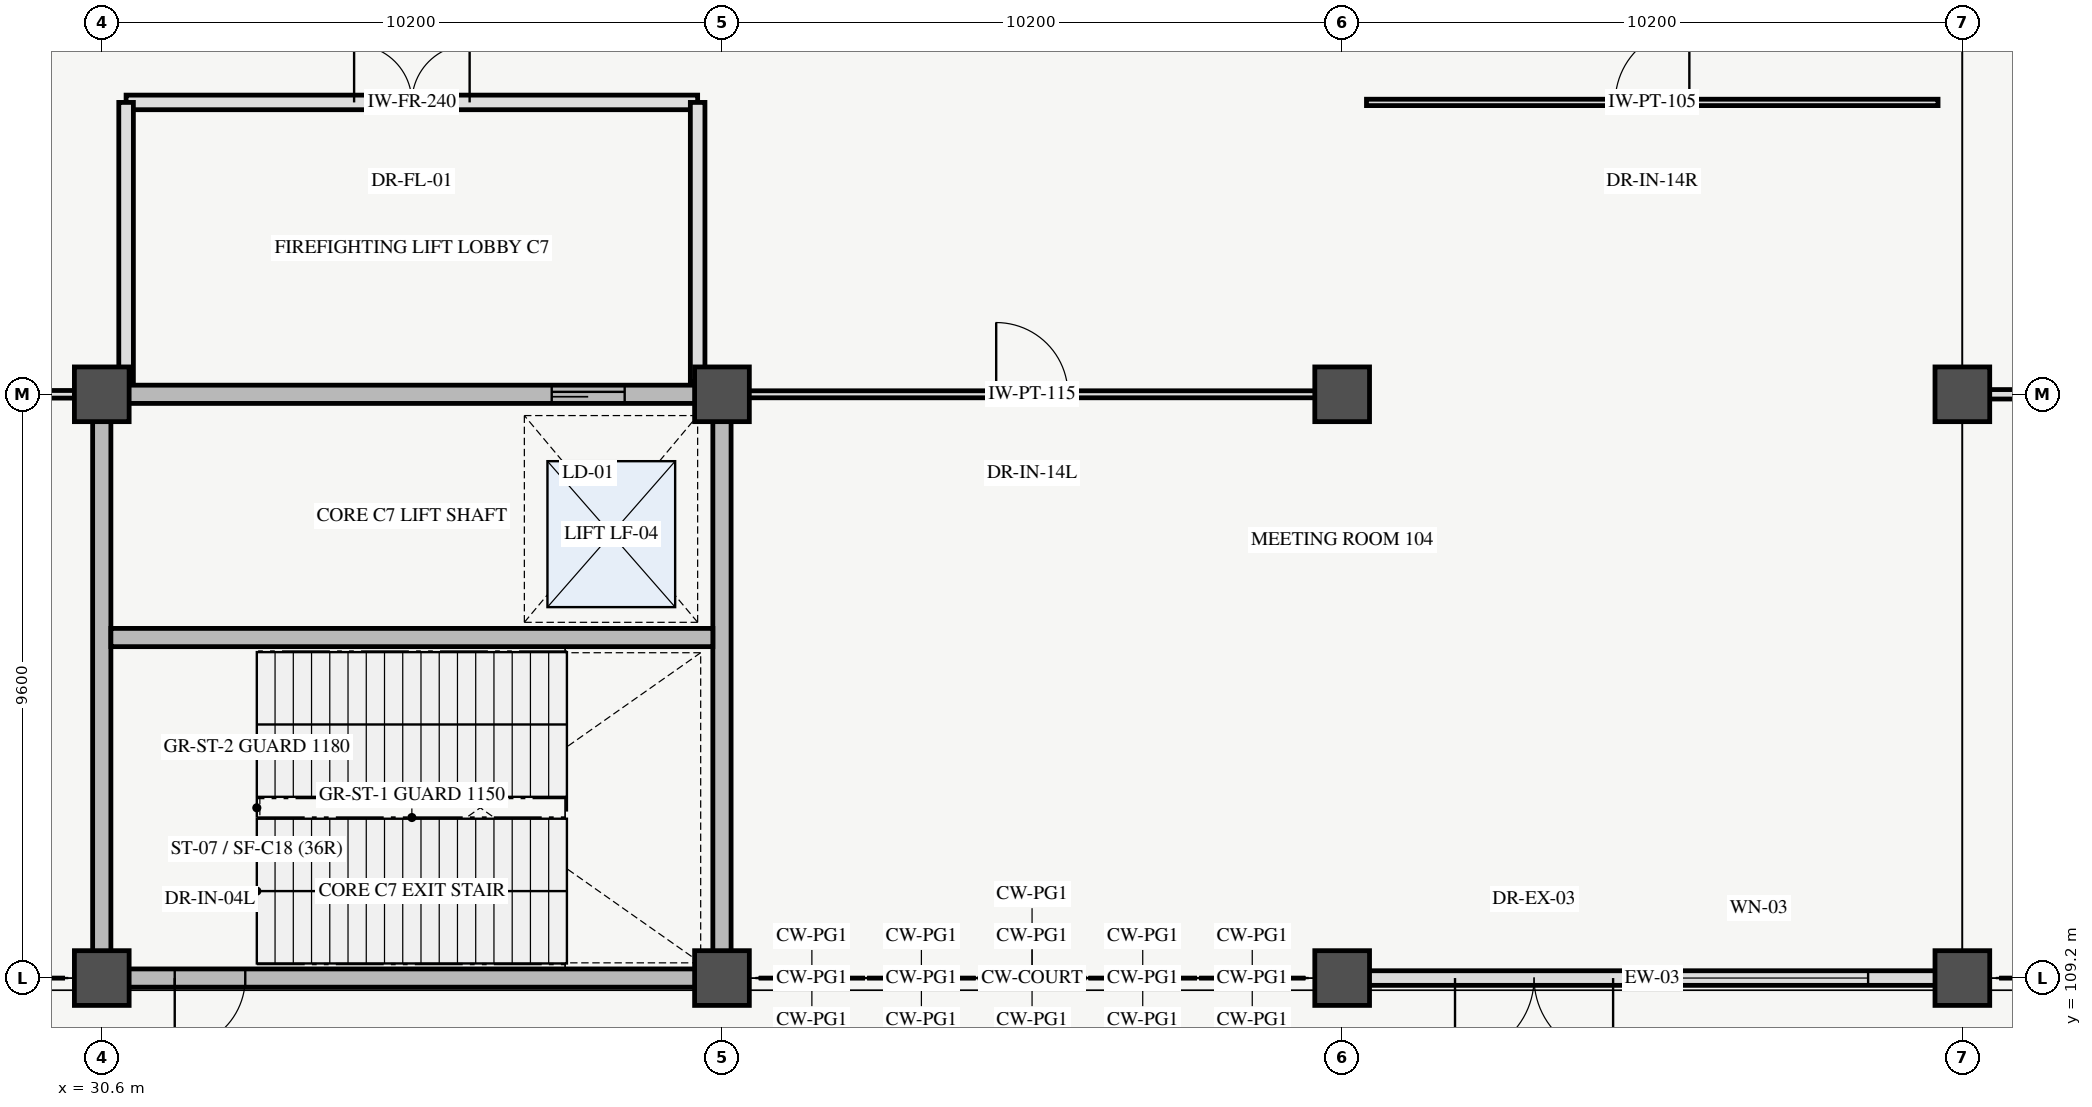
"""IFC4 building model, lengths in metres.
Left out: names, types, materials, properties, quantities, classifications, styles, units other than length and angle.
Written with IfcOpenShell. Run it as: python <this file> out.ifc"""

import sys

from ifc_helpers import new_model, si_unit, direction, frame, frame_2d, origin, origin_2d, place, context, subcontext, project, spatial, rectangle, extrude, element, fill, save


model = new_model("IFC4")
c1 = context("Model", 3, precision=1e-05, world=origin(), true_north=direction((0.0, 1.0)))
c2 = subcontext(c1, "Body", "Model", "MODEL_VIEW")
j1 = project(units=[si_unit("LENGTHUNIT", "METRE"), si_unit("PLANEANGLEUNIT", "RADIAN")], contexts=[c1])
p1 = place(None, origin())
s1 = spatial("IfcSite", under=j1, at=p1, CompositionType="ELEMENT")
p2 = place(p1, origin())
s2 = spatial("IfcBuilding", under=s1, at=p2, CompositionType="ELEMENT")
p3 = place(p2, origin())
s3 = spatial("IfcBuildingStorey", under=s2, at=p3, CompositionType="ELEMENT", Elevation=0.0)
for number, where, z_axis, x_axis in (
    (1, (30.6, 109.2, 0.0), (0.0, 0.0, 1.0), (1.0, 0.0, 0.0)),
    (2, (30.6, 118.8, 0.0), (0.0, 0.0, 1.0), (1.0, 0.0, 0.0)),
    (3, (40.8, 109.2, 0.0), (0.0, 0.0, 1.0), (1.0, 0.0, 0.0)),
    (4, (40.8, 118.8, 0.0), (0.0, 0.0, 1.0), (1.0, 0.0, 0.0)),
    (5, (51.0, 109.2, 0.0), (0.0, 0.0, 1.0), (1.0, 0.0, 0.0)),
    (6, (51.0, 118.8, 0.0), (0.0, 0.0, 1.0), (1.0, 0.0, 0.0)),
    (7, (61.2, 109.2, 0.0), (0.0, 0.0, 1.0), (1.0, 0.0, 0.0)),
    (8, (61.2, 118.8, 0.0), (0.0, 0.0, 1.0), (1.0, 0.0, 0.0)),
):
    element("IfcColumn", number, at=place(p3, frame(where, z_axis=z_axis, x_axis=x_axis)), inside=s3, PredefinedType="COLUMN", context=c2, shape_type="SweptSolid", body=[
        extrude(rectangle(XDim=0.9, YDim=0.9, at=origin_2d()), origin(), (0.0, 0.0, 1.0), 5.4),
    ])
p4 = place(p3, frame((30.6, 109.2, 0.0), z_axis=(0.0, 0.0, 1.0), x_axis=(1.0, 0.0, 0.0)))
e9 = element("IfcWall", 9, at=p4, inside=s3, PredefinedType="SHEAR", context=c2, shape_type="SweptSolid", body=[
    extrude(rectangle(XDim=10.2, YDim=0.3, at=frame_2d((5.1, 0.0))), origin(), (0.0, 0.0, 1.0), 5.4),
])
p5 = place(p4, frame((1.2, 0.0, 0.0)))
e10 = element("IfcOpeningElement", 10, at=p5, cuts=e9, PredefinedType="OPENING", context=c2, shape_type="SweptSolid", body=[
    extrude(rectangle(XDim=1.16, YDim=2.2, at=frame_2d((0.58, 1.1))), frame((0.0, 0.16, 0.0), z_axis=(0.0, -1.0, 0.0), x_axis=(1.0, 0.0, 0.0)), (0.0, 0.0, 1.0), 0.32),
])
p6 = place(p3, frame((30.6, 118.8, 0.0), z_axis=(0.0, 0.0, 1.0), x_axis=(1.0, 0.0, 0.0)))
e11 = element("IfcWall", 11, at=p6, inside=s3, PredefinedType="SHEAR", context=c2, shape_type="SweptSolid", body=[
    extrude(rectangle(XDim=10.2, YDim=0.3, at=frame_2d((5.1, 0.0))), origin(), (0.0, 0.0, 1.0), 5.4),
])
p7 = place(p6, frame((7.4, 0.0, 0.0)))
e12 = element("IfcOpeningElement", 12, at=p7, cuts=e11, PredefinedType="OPENING", context=c2, shape_type="SweptSolid", body=[
    extrude(rectangle(XDim=1.2, YDim=2.25, at=frame_2d((0.6, 1.125))), frame((0.0, 0.16, 0.0), z_axis=(0.0, -1.0, 0.0), x_axis=(1.0, 0.0, 0.0)), (0.0, 0.0, 1.0), 0.32),
])
for number, where, z_axis, x_axis in (
    (13, (30.6, 109.2, 0.0), (0.0, 0.0, 1.0), (0.0, 1.0, 0.0)),
    (14, (40.8, 109.2, 0.0), (0.0, 0.0, 1.0), (0.0, 1.0, 0.0)),
):
    element("IfcWall", number, at=place(p3, frame(where, z_axis=z_axis, x_axis=x_axis)), inside=s3, PredefinedType="SHEAR", context=c2, shape_type="SweptSolid", body=[
        extrude(rectangle(XDim=9.6, YDim=0.3, at=frame_2d((4.8, 0.0))), origin(), (0.0, 0.0, 1.0), 5.4),
    ])
p8 = place(p3, frame((51.24, 109.2, 0.0), z_axis=(0.0, 0.0, 1.0), x_axis=(1.0, 0.0, 0.0)))
e15 = element("IfcWall", 15, at=p8, inside=s3, PredefinedType="STANDARD", context=c2, shape_type="SweptSolid", body=[
    extrude(rectangle(XDim=9.72, YDim=0.24, at=frame_2d((4.86, 0.0))), origin(), (0.0, 0.0, 1.0), 3.68),
])
p9 = place(p8, frame((1.616, 0.0, 0.0)))
e16 = element("IfcOpeningElement", 16, at=p9, cuts=e15, PredefinedType="OPENING", context=c2, shape_type="SweptSolid", body=[
    extrude(rectangle(XDim=2.6, YDim=2.4, at=frame_2d((1.3, 1.2))), frame((0.0, 0.13, 0.0), z_axis=(0.0, -1.0, 0.0), x_axis=(1.0, 0.0, 0.0)), (0.0, 0.0, 1.0), 0.26),
])
p10 = place(p8, frame((4.81, 0.0, 0.9)))
e17 = element("IfcOpeningElement", 17, at=p10, cuts=e15, PredefinedType="OPENING", context=c2, shape_type="SweptSolid", body=[
    extrude(rectangle(XDim=3.6, YDim=2.1, at=frame_2d((1.8, 1.05))), frame((0.0, 0.13, 0.0), z_axis=(0.0, -1.0, 0.0), x_axis=(1.0, 0.0, 0.0)), (0.0, 0.0, 1.0), 0.26),
])
p11 = place(p3, frame((30.75, 114.8, 0.0), z_axis=(0.0, 0.0, 1.0), x_axis=(1.0, 0.0, 0.0)))
e18 = element("IfcWall", 18, at=p11, inside=s3, PredefinedType="SHEAR", context=c2, shape_type="SweptSolid", body=[
    extrude(rectangle(XDim=9.9, YDim=0.3, at=frame_2d((4.95, 0.0))), origin(), (0.0, 0.0, 1.0), 5.4),
])
p12 = place(p3, frame((31.0, 123.6, 0.0), z_axis=(0.0, 0.0, 1.0), x_axis=(1.0, 0.0, 0.0)))
e19 = element("IfcWall", 19, at=p12, inside=s3, PredefinedType="PARTITIONING", context=c2, shape_type="SweptSolid", body=[
    extrude(rectangle(XDim=9.4, YDim=0.24, at=frame_2d((4.7, 0.0))), origin(), (0.0, 0.0, 1.0), 4.08),
])
p13 = place(p12, frame((3.75, 0.0, 0.0)))
e20 = element("IfcOpeningElement", 20, at=p13, cuts=e19, PredefinedType="OPENING", context=c2, shape_type="SweptSolid", body=[
    extrude(rectangle(XDim=1.9, YDim=2.25, at=frame_2d((0.95, 1.125))), frame((0.0, 0.13, 0.0), z_axis=(0.0, -1.0, 0.0), x_axis=(1.0, 0.0, 0.0)), (0.0, 0.0, 1.0), 0.26),
])
for number, where, z_axis, x_axis in (
    (21, (40.4, 119.0, 0.0), (0.0, 0.0, 1.0), (0.0, 1.0, 0.0)),
    (22, (31.0, 119.0, 0.0), (0.0, 0.0, 1.0), (0.0, 1.0, 0.0)),
):
    element("IfcWall", number, at=place(p3, frame(where, z_axis=z_axis, x_axis=x_axis)), inside=s3, PredefinedType="PARTITIONING", context=c2, shape_type="SweptSolid", body=[
        extrude(rectangle(XDim=4.6, YDim=0.24, at=frame_2d((2.3, 0.0))), origin(), (0.0, 0.0, 1.0), 4.08),
    ])
p14 = place(p3, frame((61.6, 118.8, 0.0), z_axis=(0.0, 0.0, 1.0), x_axis=(1.0, 0.0, 0.0)))
e23 = element("IfcWall", 23, at=p14, inside=s3, PredefinedType="PARTITIONING", context=c2, shape_type="SweptSolid", body=[
    extrude(rectangle(XDim=9.4, YDim=0.155, at=frame_2d((4.7, 0.0))), origin(), (0.0, 0.0, 1.0), 4.08),
])
p15 = place(p14, frame((4.21, 0.0, 0.0)))
e24 = element("IfcOpeningElement", 24, at=p15, cuts=e23, PredefinedType="OPENING", context=c2, shape_type="SweptSolid", body=[
    extrude(rectangle(XDim=0.98, YDim=2.12, at=frame_2d((0.49, 1.06))), frame((0.0, 0.087, 0.0), z_axis=(0.0, -1.0, 0.0), x_axis=(1.0, 0.0, 0.0)), (0.0, 0.0, 1.0), 0.175),
])
p16 = place(p3, frame((20.8, 118.8, 0.0), z_axis=(0.0, 0.0, 1.0), x_axis=(1.0, 0.0, 0.0)))
e25 = element("IfcWall", 25, at=p16, inside=s3, PredefinedType="PARTITIONING", context=c2, shape_type="SweptSolid", body=[
    extrude(rectangle(XDim=9.4, YDim=0.125, at=frame_2d((4.7, 0.0))), origin(), (0.0, 0.0, 1.0), 4.08),
])
p17 = place(p16, frame((4.14, 0.0, 0.0)))
e26 = element("IfcOpeningElement", 26, at=p17, cuts=e25, PredefinedType="OPENING", context=c2, shape_type="SweptSolid", body=[
    extrude(rectangle(XDim=1.12, YDim=2.18, at=frame_2d((0.56, 1.09))), frame((0.0, 0.073, 0.0), z_axis=(0.0, -1.0, 0.0), x_axis=(1.0, 0.0, 0.0)), (0.0, 0.0, 1.0), 0.145),
])
p18 = place(p3, frame((41.2, 118.8, 0.0), z_axis=(0.0, 0.0, 1.0), x_axis=(1.0, 0.0, 0.0)))
e27 = element("IfcWall", 27, at=p18, inside=s3, PredefinedType="PARTITIONING", context=c2, shape_type="SweptSolid", body=[
    extrude(rectangle(XDim=9.4, YDim=0.115, at=frame_2d((4.7, 0.0))), origin(), (0.0, 0.0, 1.0), 4.08),
])
p19 = place(p18, frame((4.11, 0.0, 0.0)))
e28 = element("IfcOpeningElement", 28, at=p19, cuts=e27, PredefinedType="OPENING", context=c2, shape_type="SweptSolid", body=[
    extrude(rectangle(XDim=1.18, YDim=2.22, at=frame_2d((0.59, 1.11))), frame((0.0, 0.067, 0.0), z_axis=(0.0, -1.0, 0.0), x_axis=(1.0, 0.0, 0.0)), (0.0, 0.0, 1.0), 0.135),
])
p20 = place(p3, frame((51.4, 123.6, 0.0), z_axis=(0.0, 0.0, 1.0), x_axis=(1.0, 0.0, 0.0)))
e29 = element("IfcWall", 29, at=p20, inside=s3, PredefinedType="PARTITIONING", context=c2, shape_type="SweptSolid", body=[
    extrude(rectangle(XDim=9.4, YDim=0.105, at=frame_2d((4.7, 0.0))), origin(), (0.0, 0.0, 1.0), 4.08),
])
p21 = place(p20, frame((4.09, 0.0, 0.0)))
e30 = element("IfcOpeningElement", 30, at=p21, cuts=e29, PredefinedType="OPENING", context=c2, shape_type="SweptSolid", body=[
    extrude(rectangle(XDim=1.22, YDim=2.22, at=frame_2d((0.61, 1.11))), frame((0.0, 0.062, 0.0), z_axis=(0.0, -1.0, 0.0), x_axis=(1.0, 0.0, 0.0)), (0.0, 0.0, 1.0), 0.125),
])
p22 = place(p9, frame((2.6, 0.0, 0.0), z_axis=(0.0, 0.0, 1.0), x_axis=(-1.0, 0.0, 0.0)))
e31 = element("IfcDoor", 31, at=p22, inside=s3, OperationType="DOUBLE_DOOR_SINGLE_SWING", PredefinedType="DOOR", context=c2, shape_type="SweptSolid", body=[
    extrude(rectangle(XDim=2.6, YDim=2.4, at=frame_2d((1.3, 1.2))), frame((0.0, 0.025, 0.0), z_axis=(0.0, -1.0, 0.0), x_axis=(1.0, 0.0, 0.0)), (0.0, 0.0, 1.0), 0.05),
])
fill(e16, e31)
p23 = place(p10, origin())
e32 = element("IfcWindow", 32, at=p23, inside=s3, PartitioningType="TRIPLE_PANEL_VERTICAL", PredefinedType="WINDOW", context=c2, shape_type="SweptSolid", body=[
    extrude(rectangle(XDim=3.6, YDim=2.1, at=frame_2d((1.8, 1.05))), frame((0.0, 0.03, 0.0), z_axis=(0.0, -1.0, 0.0), x_axis=(1.0, 0.0, 0.0)), (0.0, 0.0, 1.0), 0.06),
])
fill(e17, e32)
p24 = place(p5, frame((1.16, 0.0, 0.0), z_axis=(0.0, 0.0, 1.0), x_axis=(-1.0, 0.0, 0.0)))
e33 = element("IfcDoor", 33, at=p24, inside=s3, OperationType="SINGLE_SWING_LEFT", PredefinedType="DOOR", context=c2, shape_type="SweptSolid", body=[
    extrude(rectangle(XDim=1.16, YDim=2.2, at=frame_2d((0.58, 1.1))), frame((0.0, 0.025, 0.0), z_axis=(0.0, -1.0, 0.0), x_axis=(1.0, 0.0, 0.0)), (0.0, 0.0, 1.0), 0.05),
])
fill(e10, e33)
p25 = place(p7, origin())
e34 = element("IfcDoor", 34, at=p25, inside=s3, OperationType="SLIDING_TO_LEFT", PredefinedType="DOOR", context=c2, shape_type="SweptSolid", body=[
    extrude(rectangle(XDim=1.2, YDim=2.25, at=frame_2d((0.6, 1.125))), frame((0.0, 0.025, 0.0), z_axis=(0.0, -1.0, 0.0), x_axis=(1.0, 0.0, 0.0)), (0.0, 0.0, 1.0), 0.05),
])
fill(e12, e34)
p26 = place(p13, origin())
e35 = element("IfcDoor", 35, at=p26, inside=s3, OperationType="DOUBLE_DOOR_SINGLE_SWING", PredefinedType="DOOR", context=c2, shape_type="SweptSolid", body=[
    extrude(rectangle(XDim=1.9, YDim=2.25, at=frame_2d((0.95, 1.125))), frame((0.0, 0.025, 0.0), z_axis=(0.0, -1.0, 0.0), x_axis=(1.0, 0.0, 0.0)), (0.0, 0.0, 1.0), 0.05),
])
fill(e20, e35)
p27 = place(p19, origin())
e36 = element("IfcDoor", 36, at=p27, inside=s3, OperationType="SINGLE_SWING_LEFT", PredefinedType="DOOR", context=c2, shape_type="SweptSolid", body=[
    extrude(rectangle(XDim=1.18, YDim=2.22, at=frame_2d((0.59, 1.11))), frame((0.0, 0.025, 0.0), z_axis=(0.0, -1.0, 0.0), x_axis=(1.0, 0.0, 0.0)), (0.0, 0.0, 1.0), 0.05),
])
fill(e28, e36)
p28 = place(p21, origin())
e37 = element("IfcDoor", 37, at=p28, inside=s3, OperationType="SINGLE_SWING_RIGHT", PredefinedType="DOOR", context=c2, shape_type="SweptSolid", body=[
    extrude(rectangle(XDim=1.22, YDim=2.22, at=frame_2d((0.61, 1.11))), frame((0.0, 0.025, 0.0), z_axis=(0.0, -1.0, 0.0), x_axis=(1.0, 0.0, 0.0)), (0.0, 0.0, 1.0), 0.05),
])
fill(e30, e37)
save(model, sys.argv[1])
